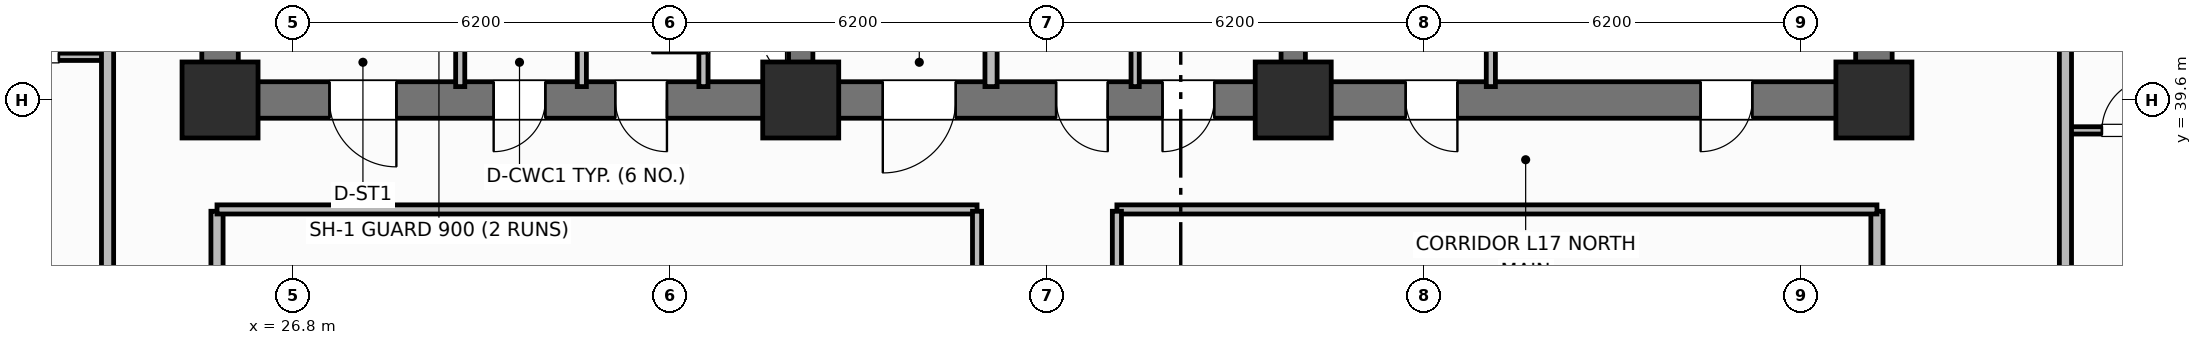
"""IFC4 building model, lengths in metres.
Left out: names, types, materials, properties, quantities, classifications, styles, units other than length and angle.
Written with IfcOpenShell. Run it as: python <this file> out.ifc"""

import sys

from ifc_helpers import new_model, si_unit, direction, frame, frame_2d, origin, origin_2d, place, context, subcontext, project, spatial, rectangle, extrude, element, fill, save


model = new_model("IFC4")
c1 = context("Model", 3, precision=1e-05, world=origin(), true_north=direction((0.0, 1.0)))
c2 = subcontext(c1, "Body", "Model", "MODEL_VIEW")
j1 = project(units=[si_unit("LENGTHUNIT", "METRE"), si_unit("PLANEANGLEUNIT", "RADIAN")], contexts=[c1])
p1 = place(None, origin())
s1 = spatial("IfcSite", under=j1, at=p1, CompositionType="ELEMENT")
p2 = place(p1, origin())
s2 = spatial("IfcBuilding", under=s1, at=p2, CompositionType="ELEMENT")
p3 = place(p2, frame((0.0, 0.0, 69.5)))
s3 = spatial("IfcBuildingStorey", under=s2, at=p3, CompositionType="ELEMENT", Elevation=69.5)
for number, where, z_axis, x_axis in (
    (1, (25.6, 39.9, 0.0), (0.0, 0.0, 1.0), (0.0, 1.0, 0.0)),
    (2, (52.8, 39.9, 0.0), (0.0, 0.0, 1.0), (0.0, 1.0, 0.0)),
):
    element("IfcWall", number, at=place(p3, frame(where, z_axis=z_axis, x_axis=x_axis)), inside=s3, PredefinedType="SHEAR", context=c2, shape_type="SweptSolid", body=[
        extrude(rectangle(XDim=5.6, YDim=0.6, at=frame_2d((2.8, 0.0))), origin(), (0.0, 0.0, 1.0), 3.7),
    ])
p4 = place(p3, frame((52.8, 39.6, 0.0), z_axis=(0.0, 0.0, 1.0), x_axis=(-1.0, 0.0, 0.0)))
e3 = element("IfcWall", 3, at=p4, inside=s3, PredefinedType="SHEAR", context=c2, shape_type="SweptSolid", body=[
    extrude(rectangle(XDim=27.2, YDim=0.6, at=frame_2d((13.6, 0.0))), origin(), (0.0, 0.0, 1.0), 3.7),
])
p5 = place(p4, frame((24.3, 0.0, 0.0)))
e4 = element("IfcOpeningElement", 4, at=p5, cuts=e3, PredefinedType="OPENING", context=c2, shape_type="SweptSolid", body=[
    extrude(rectangle(XDim=1.1, YDim=2.15, at=frame_2d((0.55, 1.075))), frame((0.0, 0.31, 0.0), z_axis=(0.0, -1.0, 0.0), x_axis=(1.0, 0.0, 0.0)), (0.0, 0.0, 1.0), 0.62),
])
p6 = place(p4, frame((21.85, 0.0, 0.0)))
e5 = element("IfcOpeningElement", 5, at=p6, cuts=e3, PredefinedType="OPENING", context=c2, shape_type="SweptSolid", body=[
    extrude(rectangle(XDim=0.85, YDim=2.1, at=frame_2d((0.425, 1.05))), frame((0.0, 0.31, 0.0), z_axis=(0.0, -1.0, 0.0), x_axis=(1.0, 0.0, 0.0)), (0.0, 0.0, 1.0), 0.62),
])
p7 = place(p4, frame((19.85, 0.0, 0.0)))
e6 = element("IfcOpeningElement", 6, at=p7, cuts=e3, PredefinedType="OPENING", context=c2, shape_type="SweptSolid", body=[
    extrude(rectangle(XDim=0.85, YDim=2.1, at=frame_2d((0.425, 1.05))), frame((0.0, 0.31, 0.0), z_axis=(0.0, -1.0, 0.0), x_axis=(1.0, 0.0, 0.0)), (0.0, 0.0, 1.0), 0.62),
])
p8 = place(p4, frame((15.1, 0.0, 0.0)))
e7 = element("IfcOpeningElement", 7, at=p8, cuts=e3, PredefinedType="OPENING", context=c2, shape_type="SweptSolid", body=[
    extrude(rectangle(XDim=1.2, YDim=2.15, at=frame_2d((0.6, 1.075))), frame((0.0, 0.31, 0.0), z_axis=(0.0, -1.0, 0.0), x_axis=(1.0, 0.0, 0.0)), (0.0, 0.0, 1.0), 0.62),
])
p9 = place(p4, frame((12.6, 0.0, 0.0)))
e8 = element("IfcOpeningElement", 8, at=p9, cuts=e3, PredefinedType="OPENING", context=c2, shape_type="SweptSolid", body=[
    extrude(rectangle(XDim=0.85, YDim=2.1, at=frame_2d((0.425, 1.05))), frame((0.0, 0.31, 0.0), z_axis=(0.0, -1.0, 0.0), x_axis=(1.0, 0.0, 0.0)), (0.0, 0.0, 1.0), 0.62),
])
p10 = place(p4, frame((10.85, 0.0, 0.0)))
e9 = element("IfcOpeningElement", 9, at=p10, cuts=e3, PredefinedType="OPENING", context=c2, shape_type="SweptSolid", body=[
    extrude(rectangle(XDim=0.85, YDim=2.1, at=frame_2d((0.425, 1.05))), frame((0.0, 0.31, 0.0), z_axis=(0.0, -1.0, 0.0), x_axis=(1.0, 0.0, 0.0)), (0.0, 0.0, 1.0), 0.62),
])
p11 = place(p4, frame((6.85, 0.0, 0.0)))
e10 = element("IfcOpeningElement", 10, at=p11, cuts=e3, PredefinedType="OPENING", context=c2, shape_type="SweptSolid", body=[
    extrude(rectangle(XDim=0.85, YDim=2.1, at=frame_2d((0.425, 1.05))), frame((0.0, 0.31, 0.0), z_axis=(0.0, -1.0, 0.0), x_axis=(1.0, 0.0, 0.0)), (0.0, 0.0, 1.0), 0.62),
])
p12 = place(p4, frame((2.0, 0.0, 0.0)))
e11 = element("IfcOpeningElement", 11, at=p12, cuts=e3, PredefinedType="OPENING", context=c2, shape_type="SweptSolid", body=[
    extrude(rectangle(XDim=0.85, YDim=2.1, at=frame_2d((0.425, 1.05))), frame((0.0, 0.31, 0.0), z_axis=(0.0, -1.0, 0.0), x_axis=(1.0, 0.0, 0.0)), (0.0, 0.0, 1.0), 0.62),
])
for number, where, z_axis, x_axis in (
    (12, (35.15, 39.9, 0.0), (0.0, 0.0, 1.0), (0.0, 1.0, 0.0)),
    (13, (43.25, 39.9, 0.0), (0.0, 0.0, 1.0), (0.0, 1.0, 0.0)),
):
    element("IfcWall", number, at=place(p3, frame(where, z_axis=z_axis, x_axis=x_axis)), inside=s3, PredefinedType="SHEAR", context=c2, shape_type="SweptSolid", body=[
        extrude(rectangle(XDim=5.6, YDim=0.4, at=frame_2d((2.8, 0.0))), origin(), (0.0, 0.0, 1.0), 3.7),
    ])
for number, where, z_axis, x_axis in (
    (14, (25.6, 39.6, 0.0), (0.0, 0.0, 1.0), (1.0, 0.0, 0.0)),
    (15, (35.15, 39.6, 0.0), (0.0, 0.0, 1.0), (1.0, 0.0, 0.0)),
    (16, (43.25, 39.6, 0.0), (0.0, 0.0, 1.0), (1.0, 0.0, 0.0)),
    (17, (52.8, 39.6, 0.0), (0.0, 0.0, 1.0), (1.0, 0.0, 0.0)),
):
    element("IfcColumn", number, at=place(p3, frame(where, z_axis=z_axis, x_axis=x_axis)), inside=s3, PredefinedType="COLUMN", context=c2, shape_type="SweptSolid", body=[
        extrude(rectangle(XDim=1.25, YDim=1.25, at=origin_2d()), origin(), (0.0, 0.0, 1.0), 3.7),
    ])
p13 = place(p3, frame((33.55, 39.82, 0.0), z_axis=(0.0, 0.0, 1.0), x_axis=(0.0, 1.0, 0.0)))
e18 = element("IfcWall", 18, at=p13, inside=s3, PredefinedType="PARTITIONING", context=c2, shape_type="SweptSolid", body=[
    extrude(rectangle(XDim=2.13, YDim=0.15, at=frame_2d((1.065, 0.0))), origin(), (0.0, 0.0, 1.0), 2.53),
])
p14 = place(p13, frame((0.55, 0.0, 0.0)))
e19 = element("IfcOpeningElement", 19, at=p14, cuts=e18, PredefinedType="OPENING", context=c2, shape_type="SweptSolid", body=[
    extrude(rectangle(XDim=0.85, YDim=2.05, at=frame_2d((0.425, 1.025))), frame((0.0, 0.085, 0.0), z_axis=(0.0, -1.0, 0.0), x_axis=(1.0, 0.0, 0.0)), (0.0, 0.0, 1.0), 0.17),
])
for number, where, z_axis, x_axis in (
    (20, (29.55, 39.82, 0.0), (0.0, 0.0, 1.0), (0.0, 1.0, 0.0)),
    (21, (31.55, 39.82, 0.0), (0.0, 0.0, 1.0), (0.0, 1.0, 0.0)),
):
    element("IfcWall", number, at=place(p3, frame(where, z_axis=z_axis, x_axis=x_axis)), inside=s3, PredefinedType="PARTITIONING", context=c2, shape_type="SweptSolid", body=[
        extrude(rectangle(XDim=2.13, YDim=0.15, at=frame_2d((1.065, 0.0))), origin(), (0.0, 0.0, 1.0), 2.53),
    ])
p15 = place(p3, frame((38.28, 39.82, 0.0), z_axis=(0.0, 0.0, 1.0), x_axis=(0.0, 1.0, 0.0)))
e22 = element("IfcWall", 22, at=p15, inside=s3, PredefinedType="PARTITIONING", context=c2, shape_type="SweptSolid", body=[
    extrude(rectangle(XDim=2.73, YDim=0.2, at=frame_2d((1.365, 0.0))), origin(), (0.0, 0.0, 1.0), 2.53),
])
p16 = place(p3, frame((40.65, 39.82, 0.0), z_axis=(0.0, 0.0, 1.0), x_axis=(0.0, 1.0, 0.0)))
e23 = element("IfcWall", 23, at=p16, inside=s3, PredefinedType="PARTITIONING", context=c2, shape_type="SweptSolid", body=[
    extrude(rectangle(XDim=2.73, YDim=0.135, at=frame_2d((1.365, 0.0))), origin(), (0.0, 0.0, 1.0), 2.53),
])
p17 = place(p3, frame((46.5, 39.82, 0.0), z_axis=(0.0, 0.0, 1.0), x_axis=(0.0, 1.0, 0.0)))
e24 = element("IfcWall", 24, at=p17, inside=s3, PredefinedType="PARTITIONING", context=c2, shape_type="SweptSolid", body=[
    extrude(rectangle(XDim=2.73, YDim=0.15, at=frame_2d((1.365, 0.0))), origin(), (0.0, 0.0, 1.0), 2.53),
])
for number, where, z_axis, x_axis in (
    (25, (25.55, 18.63, 0.0), (0.0, 0.0, 1.0), (0.0, 1.0, 0.0)),
    (26, (52.85, 18.63, 0.0), (0.0, 0.0, 1.0), (0.0, 1.0, 0.0)),
):
    element("IfcWall", number, at=place(p3, frame(where, z_axis=z_axis, x_axis=x_axis)), inside=s3, PredefinedType="PARTITIONING", context=c2, shape_type="SweptSolid", body=[
        extrude(rectangle(XDim=19.14, YDim=0.2, at=frame_2d((9.57, 0.0))), origin(), (0.0, 0.0, 1.0), 2.53),
    ])
for number, where, z_axis, x_axis in (
    (27, (25.55, 37.8, 0.0), (0.0, 0.0, 1.0), (1.0, 0.0, 0.0)),
    (28, (40.35, 37.8, 0.0), (0.0, 0.0, 1.0), (1.0, 0.0, 0.0)),
):
    element("IfcWall", number, at=place(p3, frame(where, z_axis=z_axis, x_axis=x_axis)), inside=s3, PredefinedType="PARTITIONING", context=c2, shape_type="SweptSolid", body=[
        extrude(rectangle(XDim=12.5, YDim=0.15, at=frame_2d((6.25, 0.0))), origin(), (0.0, 0.0, 1.0), 2.53),
    ])
p18 = place(p3, frame((38.05, 18.63, 0.0), z_axis=(0.0, 0.0, 1.0), x_axis=(0.0, 1.0, 0.0)))
e29 = element("IfcWall", 29, at=p18, inside=s3, PredefinedType="PARTITIONING", context=c2, shape_type="SweptSolid", body=[
    extrude(rectangle(XDim=19.14, YDim=0.15, at=frame_2d((9.57, 0.0))), origin(), (0.0, 0.0, 1.0), 2.53),
])
p19 = place(p18, frame((2.2, 0.0, 0.0)))
e30 = element("IfcOpeningElement", 30, at=p19, cuts=e29, PredefinedType="OPENING", context=c2, shape_type="SweptSolid", body=[
    extrude(rectangle(XDim=1.0, YDim=2.15, at=frame_2d((0.5, 1.075))), frame((0.0, 0.085, 0.0), z_axis=(0.0, -1.0, 0.0), x_axis=(1.0, 0.0, 0.0)), (0.0, 0.0, 1.0), 0.17),
])
p20 = place(p18, frame((12.518, 0.0, 0.0)))
e31 = element("IfcOpeningElement", 31, at=p20, cuts=e29, PredefinedType="OPENING", context=c2, shape_type="SweptSolid", body=[
    extrude(rectangle(XDim=1.0, YDim=2.15, at=frame_2d((0.5, 1.075))), frame((0.0, 0.085, 0.0), z_axis=(0.0, -1.0, 0.0), x_axis=(1.0, 0.0, 0.0)), (0.0, 0.0, 1.0), 0.17),
])
p21 = place(p3, frame((40.35, 18.63, 0.0), z_axis=(0.0, 0.0, 1.0), x_axis=(0.0, 1.0, 0.0)))
e32 = element("IfcWall", 32, at=p21, inside=s3, PredefinedType="PARTITIONING", context=c2, shape_type="SweptSolid", body=[
    extrude(rectangle(XDim=19.14, YDim=0.15, at=frame_2d((9.57, 0.0))), origin(), (0.0, 0.0, 1.0), 2.53),
])
p22 = place(p21, frame((2.2, 0.0, 0.0)))
e33 = element("IfcOpeningElement", 33, at=p22, cuts=e32, PredefinedType="OPENING", context=c2, shape_type="SweptSolid", body=[
    extrude(rectangle(XDim=1.0, YDim=2.15, at=frame_2d((0.5, 1.075))), frame((0.0, 0.085, 0.0), z_axis=(0.0, -1.0, 0.0), x_axis=(1.0, 0.0, 0.0)), (0.0, 0.0, 1.0), 0.17),
])
p23 = place(p21, frame((12.518, 0.0, 0.0)))
e34 = element("IfcOpeningElement", 34, at=p23, cuts=e32, PredefinedType="OPENING", context=c2, shape_type="SweptSolid", body=[
    extrude(rectangle(XDim=0.9, YDim=2.1, at=frame_2d((0.45, 1.05))), frame((0.0, 0.085, 0.0), z_axis=(0.0, -1.0, 0.0), x_axis=(1.0, 0.0, 0.0)), (0.0, 0.0, 1.0), 0.17),
])
p24 = place(p3, frame((21.5, 40.31, 0.0), z_axis=(0.0, 0.0, 1.0), x_axis=(1.0, 0.0, 0.0)))
e35 = element("IfcWall", 35, at=p24, inside=s3, PredefinedType="PARTITIONING", context=c2, shape_type="SweptSolid", body=[
    extrude(rectangle(XDim=2.25, YDim=0.12, at=frame_2d((1.125, 0.0))), origin(), (0.0, 0.0, 1.0), 2.53),
])
p25 = place(p24, frame((0.6, 0.0, 0.0)))
e36 = element("IfcOpeningElement", 36, at=p25, cuts=e35, PredefinedType="OPENING", context=c2, shape_type="SweptSolid", body=[
    extrude(rectangle(XDim=0.85, YDim=2.1, at=frame_2d((0.425, 1.05))), frame((0.0, 0.07, 0.0), z_axis=(0.0, -1.0, 0.0), x_axis=(1.0, 0.0, 0.0)), (0.0, 0.0, 1.0), 0.14),
])
p26 = place(p3, frame((23.75, 10.6, 0.0), z_axis=(0.0, 0.0, 1.0), x_axis=(0.0, 1.0, 0.0)))
e37 = element("IfcWall", 37, at=p26, inside=s3, PredefinedType="PARTITIONING", context=c2, shape_type="SweptSolid", body=[
    extrude(rectangle(XDim=35.2, YDim=0.2, at=frame_2d((17.6, 0.0))), origin(), (0.0, 0.0, 1.0), 2.53),
])
p27 = place(p26, frame((2.65, 0.0, 0.0)))
e38 = element("IfcOpeningElement", 38, at=p27, cuts=e37, PredefinedType="OPENING", context=c2, shape_type="SweptSolid", body=[
    extrude(rectangle(XDim=1.0, YDim=2.15, at=frame_2d((0.5, 1.075))), frame((0.0, 0.11, 0.0), z_axis=(0.0, -1.0, 0.0), x_axis=(1.0, 0.0, 0.0)), (0.0, 0.0, 1.0), 0.22),
])
p28 = place(p26, frame((13.222, 0.0, 0.0)))
e39 = element("IfcOpeningElement", 39, at=p28, cuts=e37, PredefinedType="OPENING", context=c2, shape_type="SweptSolid", body=[
    extrude(rectangle(XDim=1.0, YDim=2.15, at=frame_2d((0.5, 1.075))), frame((0.0, 0.11, 0.0), z_axis=(0.0, -1.0, 0.0), x_axis=(1.0, 0.0, 0.0)), (0.0, 0.0, 1.0), 0.22),
])
p29 = place(p26, frame((25.19, 0.0, 0.0)))
e40 = element("IfcOpeningElement", 40, at=p29, cuts=e37, PredefinedType="OPENING", context=c2, shape_type="SweptSolid", body=[
    extrude(rectangle(XDim=1.0, YDim=2.15, at=frame_2d((0.5, 1.075))), frame((0.0, 0.11, 0.0), z_axis=(0.0, -1.0, 0.0), x_axis=(1.0, 0.0, 0.0)), (0.0, 0.0, 1.0), 0.22),
])
p30 = place(p3, frame((55.95, 39.1, 0.0), z_axis=(0.0, 0.0, 1.0), x_axis=(1.0, 0.0, 0.0)))
e41 = element("IfcWall", 41, at=p30, inside=s3, PredefinedType="PARTITIONING", context=c2, shape_type="SweptSolid", body=[
    extrude(rectangle(XDim=2.25, YDim=0.12, at=frame_2d((1.125, 0.0))), origin(), (0.0, 0.0, 1.0), 2.53),
])
p31 = place(p30, frame((0.6, 0.0, 0.0)))
e42 = element("IfcOpeningElement", 42, at=p31, cuts=e41, PredefinedType="OPENING", context=c2, shape_type="SweptSolid", body=[
    extrude(rectangle(XDim=0.85, YDim=2.1, at=frame_2d((0.425, 1.05))), frame((0.0, 0.07, 0.0), z_axis=(0.0, -1.0, 0.0), x_axis=(1.0, 0.0, 0.0)), (0.0, 0.0, 1.0), 0.14),
])
p32 = place(p3, frame((55.95, 10.6, 0.0), z_axis=(0.0, 0.0, 1.0), x_axis=(0.0, 1.0, 0.0)))
e43 = element("IfcWall", 43, at=p32, inside=s3, PredefinedType="PARTITIONING", context=c2, shape_type="SweptSolid", body=[
    extrude(rectangle(XDim=35.2, YDim=0.2, at=frame_2d((17.6, 0.0))), origin(), (0.0, 0.0, 1.0), 2.53),
])
p33 = place(p32, frame((2.65, 0.0, 0.0)))
e44 = element("IfcOpeningElement", 44, at=p33, cuts=e43, PredefinedType="OPENING", context=c2, shape_type="SweptSolid", body=[
    extrude(rectangle(XDim=1.0, YDim=2.15, at=frame_2d((0.5, 1.075))), frame((0.0, 0.11, 0.0), z_axis=(0.0, -1.0, 0.0), x_axis=(1.0, 0.0, 0.0)), (0.0, 0.0, 1.0), 0.22),
])
p34 = place(p32, frame((12.87, 0.0, 0.0)))
e45 = element("IfcOpeningElement", 45, at=p34, cuts=e43, PredefinedType="OPENING", context=c2, shape_type="SweptSolid", body=[
    extrude(rectangle(XDim=1.0, YDim=2.15, at=frame_2d((0.5, 1.075))), frame((0.0, 0.11, 0.0), z_axis=(0.0, -1.0, 0.0), x_axis=(1.0, 0.0, 0.0)), (0.0, 0.0, 1.0), 0.22),
])
p35 = place(p32, frame((23.65, 0.0, 0.0)))
e46 = element("IfcOpeningElement", 46, at=p35, cuts=e43, PredefinedType="OPENING", context=c2, shape_type="SweptSolid", body=[
    extrude(rectangle(XDim=1.0, YDim=2.15, at=frame_2d((0.5, 1.075))), frame((0.0, 0.11, 0.0), z_axis=(0.0, -1.0, 0.0), x_axis=(1.0, 0.0, 0.0)), (0.0, 0.0, 1.0), 0.22),
])
p36 = place(p14, origin())
e47 = element("IfcDoor", 47, at=p36, inside=s3, OperationType="SINGLE_SWING_LEFT", PredefinedType="TRAPDOOR", context=c2, shape_type="SweptSolid", body=[
    extrude(rectangle(XDim=0.85, YDim=2.05, at=frame_2d((0.425, 1.025))), frame((0.0, 0.025, 0.0), z_axis=(0.0, -1.0, 0.0), x_axis=(1.0, 0.0, 0.0)), (0.0, 0.0, 1.0), 0.05),
])
fill(e19, e47)
p37 = place(p25, origin())
e48 = element("IfcDoor", 48, at=p37, inside=s3, OperationType="SINGLE_SWING_LEFT", PredefinedType="DOOR", context=c2, shape_type="SweptSolid", body=[
    extrude(rectangle(XDim=0.85, YDim=2.1, at=frame_2d((0.425, 1.05))), frame((0.0, 0.025, 0.0), z_axis=(0.0, -1.0, 0.0), x_axis=(1.0, 0.0, 0.0)), (0.0, 0.0, 1.0), 0.05),
])
fill(e36, e48)
p38 = place(p31, origin())
e49 = element("IfcDoor", 49, at=p38, inside=s3, OperationType="SINGLE_SWING_RIGHT", PredefinedType="DOOR", context=c2, shape_type="SweptSolid", body=[
    extrude(rectangle(XDim=0.85, YDim=2.1, at=frame_2d((0.425, 1.05))), frame((0.0, 0.025, 0.0), z_axis=(0.0, -1.0, 0.0), x_axis=(1.0, 0.0, 0.0)), (0.0, 0.0, 1.0), 0.05),
])
fill(e42, e49)
p39 = place(p5, origin())
e50 = element("IfcDoor", 50, at=p39, inside=s3, OperationType="SINGLE_SWING_LEFT", PredefinedType="DOOR", context=c2, shape_type="SweptSolid", body=[
    extrude(rectangle(XDim=1.1, YDim=2.15, at=frame_2d((0.55, 1.075))), frame((0.0, 0.025, 0.0), z_axis=(0.0, -1.0, 0.0), x_axis=(1.0, 0.0, 0.0)), (0.0, 0.0, 1.0), 0.05),
])
fill(e4, e50)
p40 = place(p6, origin())
e51 = element("IfcDoor", 51, at=p40, inside=s3, OperationType="SINGLE_SWING_RIGHT", PredefinedType="DOOR", context=c2, shape_type="SweptSolid", body=[
    extrude(rectangle(XDim=0.85, YDim=2.1, at=frame_2d((0.425, 1.05))), frame((0.0, 0.025, 0.0), z_axis=(0.0, -1.0, 0.0), x_axis=(1.0, 0.0, 0.0)), (0.0, 0.0, 1.0), 0.05),
])
fill(e5, e51)
p41 = place(p7, origin())
e52 = element("IfcDoor", 52, at=p41, inside=s3, OperationType="SINGLE_SWING_LEFT", PredefinedType="DOOR", context=c2, shape_type="SweptSolid", body=[
    extrude(rectangle(XDim=0.85, YDim=2.1, at=frame_2d((0.425, 1.05))), frame((0.0, 0.025, 0.0), z_axis=(0.0, -1.0, 0.0), x_axis=(1.0, 0.0, 0.0)), (0.0, 0.0, 1.0), 0.05),
])
fill(e6, e52)
p42 = place(p8, origin())
e53 = element("IfcDoor", 53, at=p42, inside=s3, OperationType="SINGLE_SWING_RIGHT", PredefinedType="DOOR", context=c2, shape_type="SweptSolid", body=[
    extrude(rectangle(XDim=1.2, YDim=2.15, at=frame_2d((0.6, 1.075))), frame((0.0, 0.025, 0.0), z_axis=(0.0, -1.0, 0.0), x_axis=(1.0, 0.0, 0.0)), (0.0, 0.0, 1.0), 0.05),
])
fill(e7, e53)
p43 = place(p9, origin())
e54 = element("IfcDoor", 54, at=p43, inside=s3, OperationType="SINGLE_SWING_LEFT", PredefinedType="DOOR", context=c2, shape_type="SweptSolid", body=[
    extrude(rectangle(XDim=0.85, YDim=2.1, at=frame_2d((0.425, 1.05))), frame((0.0, 0.025, 0.0), z_axis=(0.0, -1.0, 0.0), x_axis=(1.0, 0.0, 0.0)), (0.0, 0.0, 1.0), 0.05),
])
fill(e8, e54)
p44 = place(p10, origin())
e55 = element("IfcDoor", 55, at=p44, inside=s3, OperationType="SINGLE_SWING_RIGHT", PredefinedType="DOOR", context=c2, shape_type="SweptSolid", body=[
    extrude(rectangle(XDim=0.85, YDim=2.1, at=frame_2d((0.425, 1.05))), frame((0.0, 0.025, 0.0), z_axis=(0.0, -1.0, 0.0), x_axis=(1.0, 0.0, 0.0)), (0.0, 0.0, 1.0), 0.05),
])
fill(e9, e55)
p45 = place(p11, origin())
e56 = element("IfcDoor", 56, at=p45, inside=s3, OperationType="SINGLE_SWING_LEFT", PredefinedType="DOOR", context=c2, shape_type="SweptSolid", body=[
    extrude(rectangle(XDim=0.85, YDim=2.1, at=frame_2d((0.425, 1.05))), frame((0.0, 0.025, 0.0), z_axis=(0.0, -1.0, 0.0), x_axis=(1.0, 0.0, 0.0)), (0.0, 0.0, 1.0), 0.05),
])
fill(e10, e56)
p46 = place(p12, origin())
e57 = element("IfcDoor", 57, at=p46, inside=s3, OperationType="SINGLE_SWING_RIGHT", PredefinedType="DOOR", context=c2, shape_type="SweptSolid", body=[
    extrude(rectangle(XDim=0.85, YDim=2.1, at=frame_2d((0.425, 1.05))), frame((0.0, 0.025, 0.0), z_axis=(0.0, -1.0, 0.0), x_axis=(1.0, 0.0, 0.0)), (0.0, 0.0, 1.0), 0.05),
])
fill(e11, e57)
save(model, sys.argv[1])
